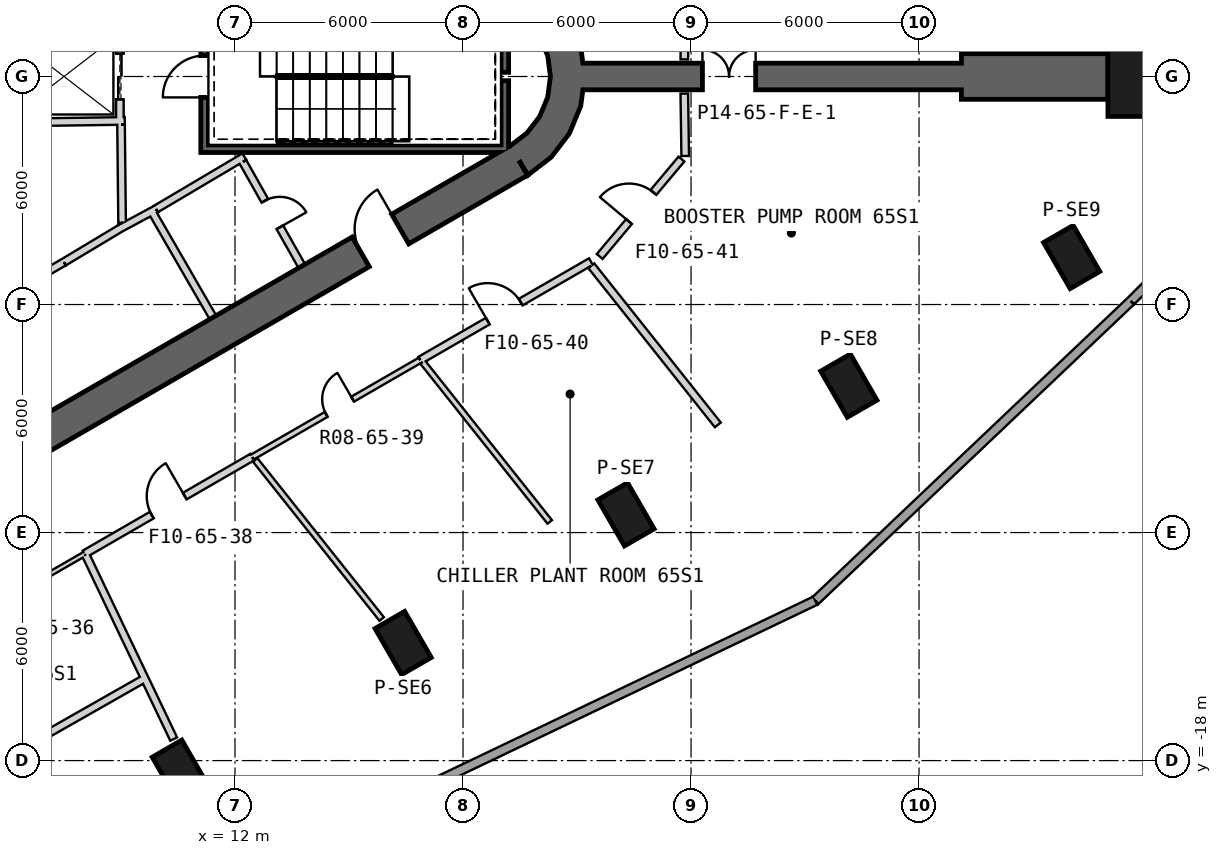
"""IFC4 building model, lengths in metres.
Left out: names, types, materials, properties, quantities, classifications, styles, units other than length and angle.
Written with IfcOpenShell. Run it as: python <this file> out.ifc"""

import sys

from ifc_helpers import new_model, si_unit, direction, frame, frame_2d, origin, origin_2d, place, context, subcontext, project, spatial, polyline, rectangle, outline, extrude, element, fill, save


model = new_model("IFC4")
c1 = context("Model", 3, precision=1e-05, world=origin(), true_north=direction((0.0, 1.0)))
c2 = subcontext(c1, "Body", "Model", "MODEL_VIEW")
j1 = project(units=[si_unit("LENGTHUNIT", "METRE"), si_unit("PLANEANGLEUNIT", "RADIAN")], contexts=[c1])
p1 = place(None, origin())
s1 = spatial("IfcSite", under=j1, at=p1, CompositionType="ELEMENT")
p2 = place(p1, origin())
s2 = spatial("IfcBuilding", under=s1, at=p2, CompositionType="ELEMENT")
p3 = place(p2, frame((0.0, 0.0, 292.7)))
s3 = spatial("IfcBuildingStorey", under=s2, at=p3, CompositionType="ELEMENT", Elevation=292.7)
p4 = place(p3, frame((36.27, 0.0, 0.0), z_axis=(0.0, 0.0, 1.0), x_axis=(1.0, 0.0, 0.0)))
e1 = element("IfcColumn", 1, at=p4, inside=s3, PredefinedType="COLUMN", context=c2, shape_type="SweptSolid", body=[
    extrude(rectangle(XDim=2.6, YDim=2.1, at=origin_2d()), origin(), (0.0, 0.0, 1.0), 5.7),
])
for number, where, z_axis, x_axis in (
    (2, (10.561, -18.292, 0.0), (0.0, 0.0, 1.0), (0.5, -0.866, 0.0)),
    (3, (16.425, -14.906, 0.0), (0.0, 0.0, 1.0), (0.5, -0.866, 0.0)),
    (4, (22.288, -11.521, 0.0), (0.0, 0.0, 1.0), (0.5, -0.866, 0.0)),
    (5, (28.152, -8.135, 0.0), (0.0, 0.0, 1.0), (0.5, -0.866, 0.0)),
    (6, (34.016, -4.75, 0.0), (0.0, 0.0, 1.0), (0.5, -0.866, 0.0)),
):
    element("IfcColumn", number, at=place(p3, frame(where, z_axis=z_axis, x_axis=x_axis)), inside=s3, PredefinedType="COLUMN", context=c2, shape_type="SweptSolid", body=[
        extrude(rectangle(XDim=1.4, YDim=0.9, at=origin_2d()), origin(), (0.0, 0.0, 1.0), 5.7),
    ])
p5 = place(p3, frame((-7.825, -17.97, 0.0), z_axis=(0.0, 0.0, 1.0), x_axis=(0.866028369851, 0.499994862586, 0.0)))
e7 = element("IfcWall", 7, at=p5, inside=s3, PredefinedType="SHEAR", context=c2, shape_type="SweptSolid", body=[
    extrude(rectangle(XDim=31.523, YDim=0.9, at=frame_2d((15.762, 0.0))), origin(), (0.0, 0.0, 1.0), 6.0),
])
p6 = place(p5, frame((26.712, 0.0, 0.0)))
e8 = element("IfcOpeningElement", 8, at=p6, cuts=e7, PredefinedType="OPENING", context=c2, shape_type="SweptSolid", body=[
    extrude(rectangle(XDim=1.2, YDim=2.4, at=frame_2d((0.6, 1.2))), frame((0.0, 0.46, 0.0), z_axis=(0.0, -1.0, 0.0), x_axis=(1.0, 0.0, 0.0)), (0.0, 0.0, 1.0), 0.92),
])
p7 = place(p5, frame((3.612, 0.0, 0.0)))
e9 = element("IfcOpeningElement", 9, at=p7, cuts=e7, PredefinedType="OPENING", context=c2, shape_type="SweptSolid", body=[
    extrude(rectangle(XDim=1.2, YDim=2.4, at=frame_2d((0.6, 1.2))), frame((0.0, 0.46, 0.0), z_axis=(0.0, -1.0, 0.0), x_axis=(1.0, 0.0, 0.0)), (0.0, 0.0, 1.0), 0.92),
])
p8 = place(p3, origin())
e10 = element("IfcWall", 10, at=p8, inside=s3, PredefinedType="SHEAR", context=c2, shape_type="SweptSolid", body=[
    extrude(outline(polyline([(19.7, -2.598), (20.321, -2.121), (20.798, -1.5), (21.098, -0.777), (21.2, 0.0), (21.098, 0.777), (20.798, 1.5), (20.321, 2.121), (19.7, 2.598), (19.25, 1.819), (19.685, 1.485), (20.019, 1.05), (20.229, 0.543), (20.3, 0.0), (20.229, -0.543), (20.019, -1.05), (19.685, -1.485), (19.25, -1.819), (19.7, -2.598)])), origin(), (0.0, 0.0, 1.0), 6.0),
])
p9 = place(p3, frame((21.15, 0.0, 0.0), z_axis=(0.0, 0.0, 1.0), x_axis=(1.0, 0.0, 0.0)))
e11 = element("IfcWall", 11, at=p9, inside=s3, PredefinedType="SHEAR", context=c2, shape_type="SweptSolid", body=[
    extrude(rectangle(XDim=9.965, YDim=0.7, at=frame_2d((4.982, 0.0))), origin(), (0.0, 0.0, 1.0), 6.0),
])
p10 = place(p9, frame((3.15, 0.0, 0.0)))
e12 = element("IfcOpeningElement", 12, at=p10, cuts=e11, PredefinedType="OPENING", context=c2, shape_type="SweptSolid", body=[
    extrude(rectangle(XDim=1.4, YDim=2.4, at=frame_2d((0.7, 1.2))), frame((0.0, 0.36, 0.0), z_axis=(0.0, -1.0, 0.0), x_axis=(1.0, 0.0, 0.0)), (0.0, 0.0, 1.0), 0.72),
])
p11 = place(p3, frame((31.115, 0.0, -0.35), z_axis=(0.0, 0.0, 1.0), x_axis=(1.0, 0.0, 0.0)))
e13 = element("IfcWall", 13, at=p11, inside=s3, PredefinedType="SHEAR", context=c2, shape_type="SweptSolid", body=[
    extrude(rectangle(XDim=3.856, YDim=1.2, at=frame_2d((1.928, 0.0))), origin(), (0.0, 0.0, 1.0), 6.35),
])
p12 = place(p3, frame((-2.998, -28.258, 0.0), z_axis=(0.0, 0.0, 1.0), x_axis=(0.902255372, 0.43120209148, 0.0)))
e14 = element("IfcWall", 14, at=p12, inside=s3, PredefinedType="SOLIDWALL", context=c2, shape_type="SweptSolid", body=[
    extrude(rectangle(XDim=33.548, YDim=0.24, at=frame_2d((16.774, 0.0))), origin(), (0.0, 0.0, 1.0), 5.7),
])
p13 = place(p3, frame((27.27, -13.792, 0.0), z_axis=(0.0, 0.0, 1.0), x_axis=(0.725309719447, 0.688422697821, 0.0)))
e15 = element("IfcWall", 15, at=p13, inside=s3, PredefinedType="SOLIDWALL", context=c2, shape_type="SweptSolid", body=[
    extrude(rectangle(XDim=11.45, YDim=0.24, at=frame_2d((5.725, 0.0))), origin(), (0.0, 0.0, 1.0), 5.7),
])
p14 = place(p3, frame((35.575, -5.909, 0.0), z_axis=(0.0, 0.0, 1.0), x_axis=(0.707106781187, 0.707106781187, 0.0)))
e16 = element("IfcWall", 16, at=p14, inside=s3, PredefinedType="SOLIDWALL", context=c2, shape_type="SweptSolid", body=[
    extrude(rectangle(XDim=3.55, YDim=0.24, at=frame_2d((1.775, 0.0))), origin(), (0.0, 0.0, 1.0), 5.7),
])
p15 = place(p3, frame((5.159, -6.236, 0.0), z_axis=(0.0, 0.0, 1.0), x_axis=(0.866036505625, 0.499980770555, 0.0)))
e17 = element("IfcWall", 17, at=p15, inside=s3, PredefinedType="PLUMBINGWALL", context=c2, shape_type="SweptSolid", body=[
    extrude(rectangle(XDim=2.7, YDim=0.2, at=frame_2d((1.35, 0.0))), origin(), (0.0, 0.0, 1.0), 5.7),
])
p16 = place(p3, frame((9.795, -3.525, 0.0), z_axis=(0.0, 0.0, 1.0), x_axis=(0.499984717929, -0.866034226713, 0.0)))
e18 = element("IfcWall", 18, at=p16, inside=s3, PredefinedType="PLUMBINGWALL", context=c2, shape_type="SweptSolid", body=[
    extrude(rectangle(XDim=3.25, YDim=0.2, at=frame_2d((1.625, 0.0))), origin(), (0.0, 0.0, 1.0), 5.7),
])
p17 = place(p3, frame((8.974, -3.999, 0.0), z_axis=(0.0, 0.0, 1.0), x_axis=(0.880907015104, 0.473289373154, 0.0)))
e19 = element("IfcWall", 19, at=p17, inside=s3, PredefinedType="PLUMBINGWALL", context=c2, shape_type="SweptSolid", body=[
    extrude(rectangle(XDim=1.078, YDim=0.2, at=frame_2d((0.539, 0.0))), origin(), (0.0, 0.0, 1.0), 5.7),
])
p18 = place(p3, frame((7.497, -4.886, 0.0), z_axis=(0.0, 0.0, 1.0), x_axis=(0.857516281273, 0.51445682749, 0.0)))
e20 = element("IfcWall", 20, at=p18, inside=s3, PredefinedType="PLUMBINGWALL", context=c2, shape_type="SweptSolid", body=[
    extrude(rectangle(XDim=1.845, YDim=0.2, at=frame_2d((0.922, 0.0))), origin(), (0.0, 0.0, 1.0), 5.7),
])
p19 = place(p3, frame((19.1, -2.0, -0.35), z_axis=(0.0, 0.0, 1.0), x_axis=(0.0, 1.0, 0.0)))
e21 = element("IfcWall", 21, at=p19, inside=s3, PredefinedType="SHEAR", context=c2, shape_type="SweptSolid", body=[
    extrude(rectangle(XDim=1.89, YDim=0.2, at=frame_2d((0.945, 0.0))), origin(), (0.0, 0.0, 1.0), 6.05),
])
p20 = place(p3, frame((19.1, 0.11, -0.35), z_axis=(0.0, 0.0, 1.0), x_axis=(0.0, 1.0, 0.0)))
e22 = element("IfcWall", 22, at=p20, inside=s3, PredefinedType="SHEAR", context=c2, shape_type="SweptSolid", body=[
    extrude(rectangle(XDim=1.69, YDim=0.2, at=frame_2d((0.845, 0.0))), origin(), (0.0, 0.0, 1.0), 6.05),
])
p21 = place(p3, frame((11.1, -1.9, -0.35), z_axis=(0.0, 0.0, 1.0), x_axis=(1.0, 0.0, 0.0)))
e23 = element("IfcWall", 23, at=p21, inside=s3, PredefinedType="SHEAR", context=c2, shape_type="SweptSolid", body=[
    extrude(rectangle(XDim=7.9, YDim=0.2, at=frame_2d((3.95, 0.0))), origin(), (0.0, 0.0, 1.0), 6.05),
])
p22 = place(p3, frame((11.2, -1.8, -0.35), z_axis=(0.0, 0.0, 1.0), x_axis=(0.0, 1.0, 0.0)))
e24 = element("IfcWall", 24, at=p22, inside=s3, PredefinedType="SHEAR", context=c2, shape_type="SweptSolid", body=[
    extrude(rectangle(XDim=3.6, YDim=0.2, at=frame_2d((1.8, 0.0))), origin(), (0.0, 0.0, 1.0), 6.05),
])
p23 = place(p22, frame((1.25, 0.0, 0.35)))
e25 = element("IfcOpeningElement", 25, at=p23, cuts=e24, PredefinedType="OPENING", context=c2, shape_type="SweptSolid", body=[
    extrude(rectangle(XDim=1.1, YDim=2.1, at=frame_2d((0.55, 1.05))), frame((0.0, 0.11, 0.0), z_axis=(0.0, -1.0, 0.0), x_axis=(1.0, 0.0, 0.0)), (0.0, 0.0, 1.0), 0.22),
])
p24 = place(p3, frame((8.97, 1.2, 0.0), z_axis=(0.0, 0.0, 1.0), x_axis=(0.0, -1.0, 0.0)))
e26 = element("IfcWall", 26, at=p24, inside=s3, PredefinedType="PLUMBINGWALL", context=c2, shape_type="SweptSolid", body=[
    extrude(rectangle(XDim=2.4, YDim=0.2, at=frame_2d((1.2, 0.0))), origin(), (0.0, 0.0, 1.0), 5.7),
])
p25 = place(p24, frame((0.6, 0.0, 0.0)))
e27 = element("IfcOpeningElement", 27, at=p25, cuts=e26, PredefinedType="OPENING", context=c2, shape_type="SweptSolid", body=[
    extrude(rectangle(XDim=1.2, YDim=2.4, at=frame_2d((0.6, 1.2))), frame((0.0, 0.11, 0.0), z_axis=(0.0, -1.0, 0.0), x_axis=(1.0, 0.0, 0.0)), (0.0, 0.0, 1.0), 0.22),
])
p26 = place(p3, frame((9.1, -1.168, 0.0), z_axis=(0.0, 0.0, 1.0), x_axis=(-0.999896137355, -0.014412303875, 0.0)))
e28 = element("IfcWall", 28, at=p26, inside=s3, PredefinedType="PLUMBINGWALL", context=c2, shape_type="SweptSolid", body=[
    extrude(rectangle(XDim=2.151, YDim=0.2, at=frame_2d((1.076, 0.0))), origin(), (0.0, 0.0, 1.0), 5.7),
])
p27 = place(p3, frame((12.245, -2.109, 0.0), z_axis=(0.0, 0.0, 1.0), x_axis=(-0.860414880418, -0.509594185166, 0.0)))
e29 = element("IfcWall", 29, at=p27, inside=s3, PredefinedType="PARTITIONING", context=c2, shape_type="SweptSolid", body=[
    extrude(rectangle(XDim=2.7, YDim=0.2, at=frame_2d((1.35, 0.0))), origin(), (0.0, 0.0, 1.0), 5.7),
])
p28 = place(p3, frame((13.758, -4.99, 0.0), z_axis=(0.0, 0.0, 1.0), x_axis=(-0.491993409184, 0.87059892334, 0.0)))
e30 = element("IfcWall", 30, at=p28, inside=s3, PredefinedType="PARTITIONING", context=c2, shape_type="SweptSolid", body=[
    extrude(rectangle(XDim=3.15, YDim=0.2, at=frame_2d((1.575, 0.0))), origin(), (0.0, 0.0, 1.0), 5.7),
])
p29 = place(p28, frame((1.175, 0.0, 0.0)))
e31 = element("IfcOpeningElement", 31, at=p29, cuts=e30, PredefinedType="OPENING", context=c2, shape_type="SweptSolid", body=[
    extrude(rectangle(XDim=0.8, YDim=2.1, at=frame_2d((0.4, 1.05))), frame((0.0, 0.11, 0.0), z_axis=(0.0, -1.0, 0.0), x_axis=(1.0, 0.0, 0.0)), (0.0, 0.0, 1.0), 0.22),
])
p30 = place(p3, frame((9.029, -3.851, 0.0), z_axis=(0.0, 0.0, 1.0), x_axis=(-0.010784614026, 0.999941844359, 0.0)))
e32 = element("IfcWall", 32, at=p30, inside=s3, PredefinedType="PARTITIONING", context=c2, shape_type="SweptSolid", body=[
    extrude(rectangle(XDim=2.581, YDim=0.2, at=frame_2d((1.291, 0.0))), origin(), (0.0, 0.0, 1.0), 5.7),
])
p31 = place(p3, frame((23.823, 0.45, 0.0), z_axis=(0.0, 0.0, 1.0), x_axis=(0.014625200909, 0.99989304603, 0.0)))
e33 = element("IfcWall", 33, at=p31, inside=s3, PredefinedType="PARTITIONING", context=c2, shape_type="SweptSolid", body=[
    extrude(rectangle(XDim=1.452, YDim=0.2, at=frame_2d((0.726, 0.0))), origin(), (0.0, 0.0, 1.0), 5.7),
])
p32 = place(p3, frame((8.041, -12.563, 0.0), z_axis=(0.0, 0.0, 1.0), x_axis=(0.866023651404, 0.500003035199, 0.0)))
e34 = element("IfcWall", 34, at=p32, inside=s3, PredefinedType="PARTITIONING", context=c2, shape_type="SweptSolid", body=[
    extrude(rectangle(XDim=5.097, YDim=0.2, at=frame_2d((2.548, 0.0))), origin(), (0.0, 0.0, 1.0), 5.07),
])
p33 = place(p32, frame((2.044, 0.0, 0.0)))
e35 = element("IfcOpeningElement", 35, at=p33, cuts=e34, PredefinedType="OPENING", context=c2, shape_type="SweptSolid", body=[
    extrude(rectangle(XDim=1.0, YDim=2.1, at=frame_2d((0.5, 1.05))), frame((0.0, 0.11, 0.0), z_axis=(0.0, -1.0, 0.0), x_axis=(1.0, 0.0, 0.0)), (0.0, 0.0, 1.0), 0.22),
])
p34 = place(p3, frame((16.876, -7.462, 0.0), z_axis=(0.0, 0.0, 1.0), x_axis=(0.866025553686, 0.499999740363, 0.0)))
e36 = element("IfcWall", 36, at=p34, inside=s3, PredefinedType="PARTITIONING", context=c2, shape_type="SweptSolid", body=[
    extrude(rectangle(XDim=5.183, YDim=0.2, at=frame_2d((2.591, 0.0))), origin(), (0.0, 0.0, 1.0), 4.98),
])
p35 = place(p34, frame((2.05, 0.0, 0.0)))
e37 = element("IfcOpeningElement", 37, at=p35, cuts=e36, PredefinedType="OPENING", context=c2, shape_type="SweptSolid", body=[
    extrude(rectangle(XDim=1.0, YDim=2.1, at=frame_2d((0.5, 1.05))), frame((0.0, 0.11, 0.0), z_axis=(0.0, -1.0, 0.0), x_axis=(1.0, 0.0, 0.0)), (0.0, 0.0, 1.0), 0.22),
])
p36 = place(p3, frame((3.976, -14.91, 0.0), z_axis=(0.0, 0.0, 1.0), x_axis=(0.866022745717, 0.500004603879, 0.0)))
e38 = element("IfcWall", 38, at=p36, inside=s3, PredefinedType="PARTITIONING", context=c2, shape_type="SweptSolid", body=[
    extrude(rectangle(XDim=4.694, YDim=0.12, at=frame_2d((2.347, 0.0))), origin(), (0.0, 0.0, 1.0), 5.07),
])
p37 = place(p36, frame((1.97, 0.0, 0.0)))
e39 = element("IfcOpeningElement", 39, at=p37, cuts=e38, PredefinedType="OPENING", context=c2, shape_type="SweptSolid", body=[
    extrude(rectangle(XDim=0.9, YDim=2.1, at=frame_2d((0.45, 1.05))), frame((0.0, 0.07, 0.0), z_axis=(0.0, -1.0, 0.0), x_axis=(1.0, 0.0, 0.0)), (0.0, 0.0, 1.0), 0.14),
])
p38 = place(p3, frame((12.455, -10.014, 0.0), z_axis=(0.0, 0.0, 1.0), x_axis=(0.866021539371, 0.5000066933, 0.0)))
e40 = element("IfcWall", 40, at=p38, inside=s3, PredefinedType="PLUMBINGWALL", context=c2, shape_type="SweptSolid", body=[
    extrude(rectangle(XDim=5.105, YDim=0.15, at=frame_2d((2.553, 0.0))), origin(), (0.0, 0.0, 1.0), 5.07),
])
p39 = place(p38, frame((2.248, 0.0, 0.0)))
e41 = element("IfcOpeningElement", 41, at=p39, cuts=e40, PredefinedType="OPENING", context=c2, shape_type="SweptSolid", body=[
    extrude(rectangle(XDim=0.8, YDim=2.1, at=frame_2d((0.4, 1.05))), frame((0.0, 0.085, 0.0), z_axis=(0.0, -1.0, 0.0), x_axis=(1.0, 0.0, 0.0)), (0.0, 0.0, 1.0), 0.17),
])
p40 = place(p3, frame((23.847, -2.092, 0.0), z_axis=(0.0, 0.0, 1.0), x_axis=(-0.014566612506, 0.999893901272, 0.0)))
e42 = element("IfcWall", 42, at=p40, inside=s3, PredefinedType="PARTITIONING", context=c2, shape_type="SweptSolid", body=[
    extrude(rectangle(XDim=1.643, YDim=0.2, at=frame_2d((0.821, 0.0))), origin(), (0.0, 0.0, 1.0), 5.7),
])
p41 = place(p3, frame((21.596, -4.736, 0.0), z_axis=(0.0, 0.0, 1.0), x_axis=(0.642784895001, 0.766046721002, 0.0)))
e43 = element("IfcWall", 43, at=p41, inside=s3, PredefinedType="PARTITIONING", context=c2, shape_type="SweptSolid", body=[
    extrude(rectangle(XDim=3.347, YDim=0.2, at=frame_2d((1.674, 0.0))), origin(), (0.0, 0.0, 1.0), 5.7),
])
p42 = place(p41, frame((1.2, 0.0, 0.0)))
e44 = element("IfcOpeningElement", 44, at=p42, cuts=e43, PredefinedType="OPENING", context=c2, shape_type="SweptSolid", body=[
    extrude(rectangle(XDim=1.0, YDim=2.1, at=frame_2d((0.5, 1.05))), frame((0.0, 0.11, 0.0), z_axis=(0.0, -1.0, 0.0), x_axis=(1.0, 0.0, 0.0)), (0.0, 0.0, 1.0), 0.22),
])
p43 = place(p3, frame((5.776, -18.028, 0.0), z_axis=(0.0, 0.0, 1.0), x_axis=(0.869329804733, 0.494232425689, 0.0)))
e45 = element("IfcWall", 45, at=p43, inside=s3, PredefinedType="PARTITIONING", context=c2, shape_type="SweptSolid", body=[
    extrude(rectangle(XDim=4.457, YDim=0.2, at=frame_2d((2.229, 0.0))), origin(), (0.0, 0.0, 1.0), 5.07),
])
p44 = place(p3, frame((10.387, -17.434, 0.0), z_axis=(0.0, 0.0, 1.0), x_axis=(-0.431219922103, 0.902246850248, 0.0)))
e46 = element("IfcWall", 46, at=p44, inside=s3, PredefinedType="PARTITIONING", context=c2, shape_type="SweptSolid", body=[
    extrude(rectangle(XDim=1.797, YDim=0.2, at=frame_2d((0.898, 0.0))), origin(), (0.0, 0.0, 1.0), 5.7),
])
p45 = place(p3, frame((8.081, -12.609, 0.0), z_axis=(0.0, 0.0, 1.0), x_axis=(0.431190278895, -0.902261017326, 0.0)))
e47 = element("IfcWall", 47, at=p45, inside=s3, PredefinedType="PARTITIONING", context=c2, shape_type="SweptSolid", body=[
    extrude(rectangle(XDim=3.551, YDim=0.2, at=frame_2d((1.775, 0.0))), origin(), (0.0, 0.0, 1.0), 5.7),
])
p46 = place(p3, frame((15.859, -14.274, 0.0), z_axis=(0.0, 0.0, 1.0), x_axis=(-0.622444161938, 0.782664209779, 0.0)))
e48 = element("IfcWall", 48, at=p46, inside=s3, PredefinedType="PLUMBINGWALL", context=c2, shape_type="SweptSolid", body=[
    extrude(rectangle(XDim=5.35, YDim=0.15, at=frame_2d((2.675, 0.0))), origin(), (0.0, 0.0, 1.0), 5.07),
])
p47 = place(p3, frame((20.282, -11.721, 0.0), z_axis=(0.0, 0.0, 1.0), x_axis=(-0.622438216908, 0.782668937759, 0.0)))
e49 = element("IfcWall", 49, at=p47, inside=s3, PredefinedType="PLUMBINGWALL", context=c2, shape_type="SweptSolid", body=[
    extrude(rectangle(XDim=5.375, YDim=0.15, at=frame_2d((2.688, 0.0))), origin(), (0.0, 0.0, 1.0), 5.07),
])
p48 = place(p3, frame((21.375, -4.98, 0.0), z_axis=(0.0, 0.0, 1.0), x_axis=(0.622444161938, -0.782664209779, 0.0)))
e50 = element("IfcWall", 50, at=p48, inside=s3, PredefinedType="PARTITIONING", context=c2, shape_type="SweptSolid", body=[
    extrude(rectangle(XDim=5.35, YDim=0.2, at=frame_2d((2.675, 0.0))), origin(), (0.0, 0.0, 1.0), 4.98),
])
p49 = place(p23, origin())
e51 = element("IfcDoor", 51, at=p49, inside=s3, OperationType="SINGLE_SWING_LEFT", PredefinedType="USERDEFINED", context=c2, shape_type="SweptSolid", body=[
    extrude(rectangle(XDim=1.1, YDim=2.1, at=frame_2d((0.55, 1.05))), frame((0.0, 0.025, 0.0), z_axis=(0.0, -1.0, 0.0), x_axis=(1.0, 0.0, 0.0)), (0.0, 0.0, 1.0), 0.05),
])
fill(e25, e51)
p50 = place(p25, origin())
e52 = element("IfcDoor", 52, at=p50, inside=s3, OperationType="SLIDING_TO_LEFT", PredefinedType="USERDEFINED", context=c2, shape_type="SweptSolid", body=[
    extrude(rectangle(XDim=1.2, YDim=2.4, at=frame_2d((0.6, 1.2))), frame((0.0, 0.025, 0.0), z_axis=(0.0, -1.0, 0.0), x_axis=(1.0, 0.0, 0.0)), (0.0, 0.0, 1.0), 0.05),
])
fill(e27, e52)
p51 = place(p29, origin())
e53 = element("IfcDoor", 53, at=p51, inside=s3, OperationType="SINGLE_SWING_LEFT", PredefinedType="USERDEFINED", context=c2, shape_type="SweptSolid", body=[
    extrude(rectangle(XDim=0.8, YDim=2.1, at=frame_2d((0.4, 1.05))), frame((0.0, 0.025, 0.0), z_axis=(0.0, -1.0, 0.0), x_axis=(1.0, 0.0, 0.0)), (0.0, 0.0, 1.0), 0.05),
])
fill(e31, e53)
p52 = place(p33, origin())
e54 = element("IfcDoor", 54, at=p52, inside=s3, OperationType="SINGLE_SWING_RIGHT", PredefinedType="USERDEFINED", context=c2, shape_type="SweptSolid", body=[
    extrude(rectangle(XDim=1.0, YDim=2.1, at=frame_2d((0.5, 1.05))), frame((0.0, 0.025, 0.0), z_axis=(0.0, -1.0, 0.0), x_axis=(1.0, 0.0, 0.0)), (0.0, 0.0, 1.0), 0.05),
])
fill(e35, e54)
p53 = place(p39, origin())
e55 = element("IfcDoor", 55, at=p53, inside=s3, OperationType="SINGLE_SWING_RIGHT", PredefinedType="USERDEFINED", context=c2, shape_type="SweptSolid", body=[
    extrude(rectangle(XDim=0.8, YDim=2.1, at=frame_2d((0.4, 1.05))), frame((0.0, 0.025, 0.0), z_axis=(0.0, -1.0, 0.0), x_axis=(1.0, 0.0, 0.0)), (0.0, 0.0, 1.0), 0.05),
])
fill(e41, e55)
p54 = place(p35, origin())
e56 = element("IfcDoor", 56, at=p54, inside=s3, OperationType="SINGLE_SWING_LEFT", PredefinedType="USERDEFINED", context=c2, shape_type="SweptSolid", body=[
    extrude(rectangle(XDim=1.0, YDim=2.1, at=frame_2d((0.5, 1.05))), frame((0.0, 0.025, 0.0), z_axis=(0.0, -1.0, 0.0), x_axis=(1.0, 0.0, 0.0)), (0.0, 0.0, 1.0), 0.05),
])
fill(e37, e56)
p55 = place(p42, origin())
e57 = element("IfcDoor", 57, at=p55, inside=s3, OperationType="SINGLE_SWING_LEFT", PredefinedType="USERDEFINED", context=c2, shape_type="SweptSolid", body=[
    extrude(rectangle(XDim=1.0, YDim=2.1, at=frame_2d((0.5, 1.05))), frame((0.0, 0.025, 0.0), z_axis=(0.0, -1.0, 0.0), x_axis=(1.0, 0.0, 0.0)), (0.0, 0.0, 1.0), 0.05),
])
fill(e44, e57)
p56 = place(p6, origin())
e58 = element("IfcDoor", 58, at=p56, inside=s3, OperationType="SINGLE_SWING_RIGHT", PredefinedType="USERDEFINED", context=c2, shape_type="SweptSolid", body=[
    extrude(rectangle(XDim=1.2, YDim=2.4, at=frame_2d((0.6, 1.2))), frame((0.0, 0.025, 0.0), z_axis=(0.0, -1.0, 0.0), x_axis=(1.0, 0.0, 0.0)), (0.0, 0.0, 1.0), 0.05),
])
fill(e8, e58)
p57 = place(p10, origin())
e59 = element("IfcDoor", 59, at=p57, inside=s3, OperationType="DOUBLE_DOOR_SINGLE_SWING", PredefinedType="NOTDEFINED", context=c2, shape_type="SweptSolid", body=[
    extrude(rectangle(XDim=1.4, YDim=2.4, at=frame_2d((0.7, 1.2))), frame((0.0, 0.025, 0.0), z_axis=(0.0, -1.0, 0.0), x_axis=(1.0, 0.0, 0.0)), (0.0, 0.0, 1.0), 0.05),
])
fill(e12, e59)
save(model, sys.argv[1])
